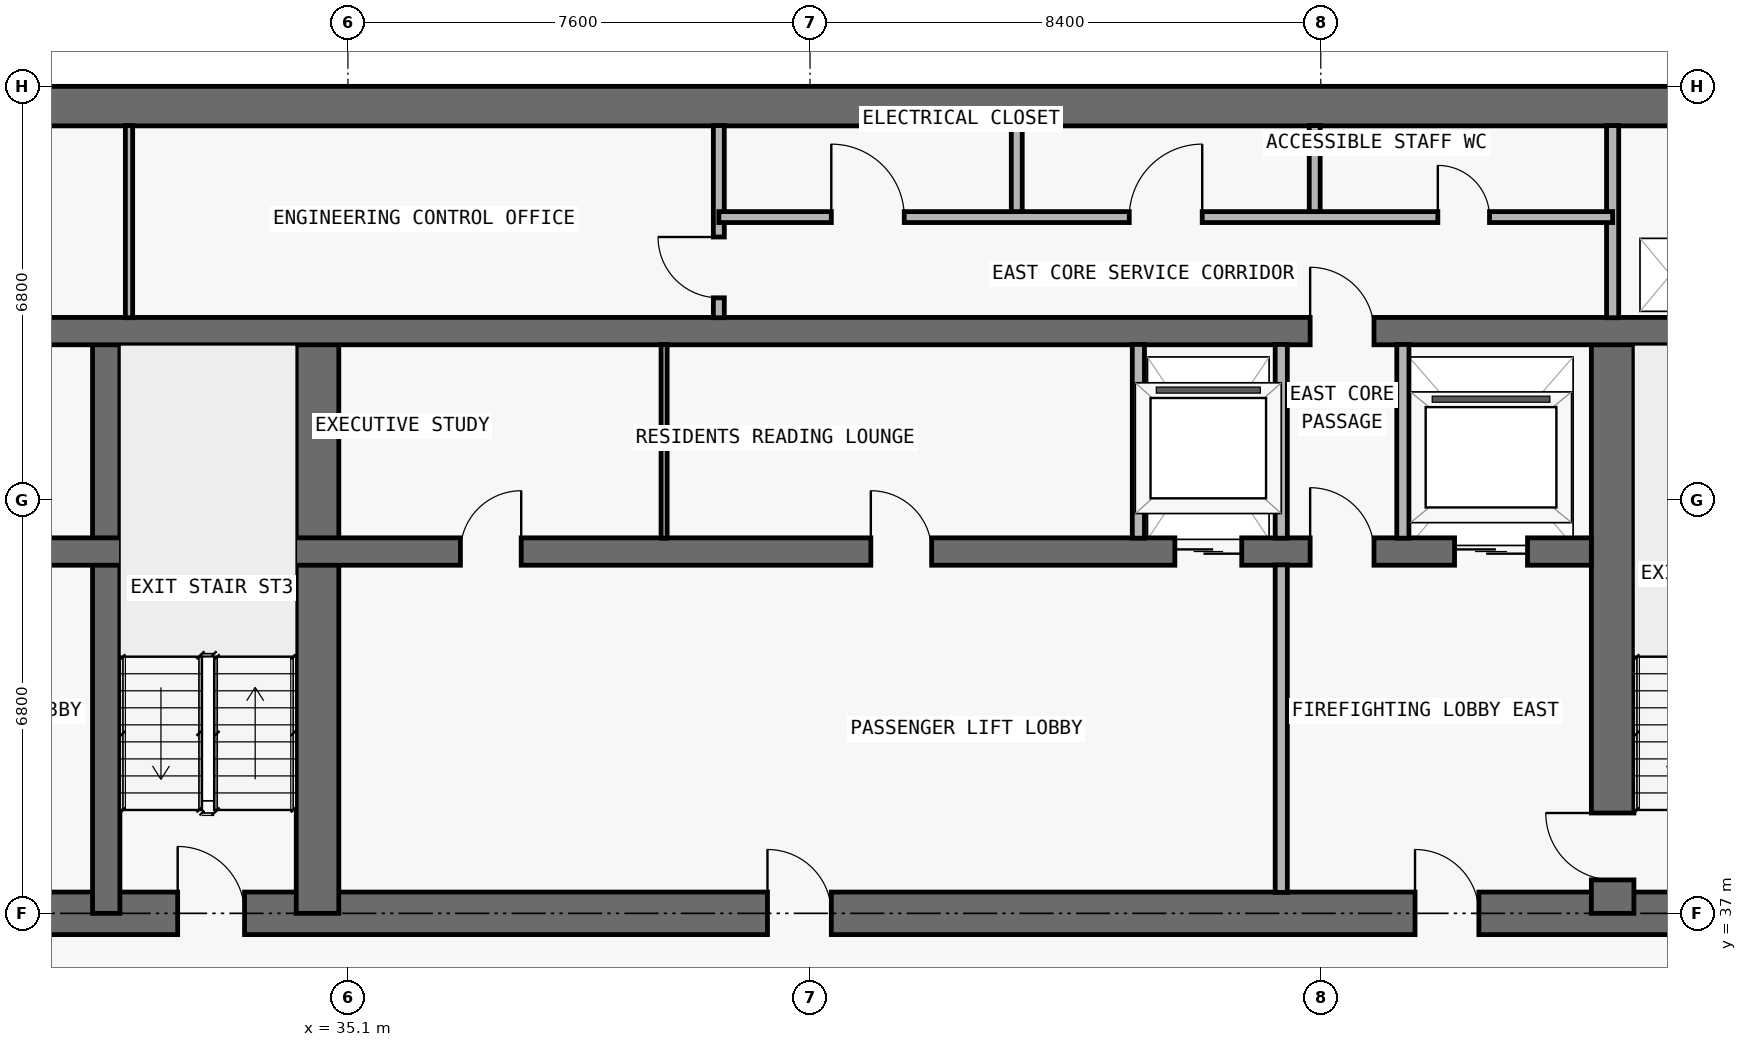
"""IFC4 building model, lengths in metres.
Left out: names, types, materials, properties, quantities, classifications, styles, units other than length and angle.
Written with IfcOpenShell. Run it as: python <this file> out.ifc"""

import sys

from ifc_helpers import new_model, si_unit, direction, frame, frame_2d, origin, place, context, subcontext, project, spatial, rectangle, extrude, element, fill, save


model = new_model("IFC4")
c1 = context("Model", 3, precision=1e-05, world=origin(), true_north=direction((0.0, 1.0)))
c2 = subcontext(c1, "Body", "Model", "MODEL_VIEW")
j1 = project(units=[si_unit("LENGTHUNIT", "METRE"), si_unit("PLANEANGLEUNIT", "RADIAN")], contexts=[c1])
p1 = place(None, origin())
s1 = spatial("IfcSite", under=j1, at=p1, CompositionType="ELEMENT")
p2 = place(p1, origin())
s2 = spatial("IfcBuilding", under=s1, at=p2, CompositionType="ELEMENT")
p3 = place(p2, frame((0.0, 0.0, 204.9)))
s3 = spatial("IfcBuildingStorey", under=s2, at=p3, CompositionType="ELEMENT", Elevation=204.9)
p4 = place(p3, frame((17.95, 37.0, 0.0), z_axis=(0.0, 0.0, 1.0), x_axis=(1.0, 0.0, 0.0)))
e1 = element("IfcWall", 1, at=p4, inside=s3, PredefinedType="SHEAR", context=c2, shape_type="SweptSolid", body=[
    extrude(rectangle(XDim=41.9, YDim=0.7, at=frame_2d((20.95, 0.0))), origin(), (0.0, 0.0, 1.0), 3.05),
])
p5 = place(p4, frame((14.35, 0.0, 0.0)))
e2 = element("IfcOpeningElement", 2, at=p5, cuts=e1, PredefinedType="OPENING", context=c2, shape_type="SweptSolid", body=[
    extrude(rectangle(XDim=1.1, YDim=2.15, at=frame_2d((0.55, 1.075))), frame((0.0, 0.36, 0.0), z_axis=(0.0, -1.0, 0.0), x_axis=(1.0, 0.0, 0.0)), (0.0, 0.0, 1.0), 0.72),
])
p6 = place(p4, frame((6.2, 0.0, 0.0)))
e3 = element("IfcOpeningElement", 3, at=p6, cuts=e1, PredefinedType="OPENING", context=c2, shape_type="SweptSolid", body=[
    extrude(rectangle(XDim=1.05, YDim=2.15, at=frame_2d((0.525, 1.075))), frame((0.0, 0.36, 0.0), z_axis=(0.0, -1.0, 0.0), x_axis=(1.0, 0.0, 0.0)), (0.0, 0.0, 1.0), 0.72),
])
p7 = place(p4, frame((34.7, 0.0, 0.0)))
e4 = element("IfcOpeningElement", 4, at=p7, cuts=e1, PredefinedType="OPENING", context=c2, shape_type="SweptSolid", body=[
    extrude(rectangle(XDim=1.05, YDim=2.15, at=frame_2d((0.525, 1.075))), frame((0.0, 0.36, 0.0), z_axis=(0.0, -1.0, 0.0), x_axis=(1.0, 0.0, 0.0)), (0.0, 0.0, 1.0), 0.72),
])
p8 = place(p4, frame((10.812, 0.0, 0.0)))
e5 = element("IfcOpeningElement", 5, at=p8, cuts=e1, PredefinedType="OPENING", context=c2, shape_type="SweptSolid", body=[
    extrude(rectangle(XDim=1.05, YDim=2.15, at=frame_2d((0.525, 1.075))), frame((0.0, 0.36, 0.0), z_axis=(0.0, -1.0, 0.0), x_axis=(1.0, 0.0, 0.0)), (0.0, 0.0, 1.0), 0.72),
])
p9 = place(p4, frame((24.05, 0.0, 0.0)))
e6 = element("IfcOpeningElement", 6, at=p9, cuts=e1, PredefinedType="OPENING", context=c2, shape_type="SweptSolid", body=[
    extrude(rectangle(XDim=1.05, YDim=2.15, at=frame_2d((0.525, 1.075))), frame((0.0, 0.36, 0.0), z_axis=(0.0, -1.0, 0.0), x_axis=(1.0, 0.0, 0.0)), (0.0, 0.0, 1.0), 0.72),
])
p10 = place(p3, frame((17.95, 50.275, 0.0), z_axis=(0.0, 0.0, 1.0), x_axis=(1.0, 0.0, 0.0)))
e7 = element("IfcWall", 7, at=p10, inside=s3, PredefinedType="SHEAR", context=c2, shape_type="SweptSolid", body=[
    extrude(rectangle(XDim=41.9, YDim=0.65, at=frame_2d((20.95, 0.0))), origin(), (0.0, 0.0, 1.0), 3.05),
])
p11 = place(p3, frame((55.9, 37.0, 0.0), z_axis=(0.0, 0.0, 1.0), x_axis=(0.0, 1.0, 0.0)))
e8 = element("IfcWall", 8, at=p11, inside=s3, PredefinedType="SHEAR", context=c2, shape_type="SweptSolid", body=[
    extrude(rectangle(XDim=9.575, YDim=0.7, at=frame_2d((4.788, 0.0))), origin(), (0.0, 0.0, 1.0), 3.05),
])
p12 = place(p11, frame((0.55, 0.0, 0.0)))
e9 = element("IfcOpeningElement", 9, at=p12, cuts=e8, PredefinedType="OPENING", context=c2, shape_type="SweptSolid", body=[
    extrude(rectangle(XDim=1.1, YDim=2.15, at=frame_2d((0.55, 1.075))), frame((0.0, 0.36, 0.0), z_axis=(0.0, -1.0, 0.0), x_axis=(1.0, 0.0, 0.0)), (0.0, 0.0, 1.0), 0.72),
])
p13 = place(p3, frame((31.125, 37.0, 0.0), z_axis=(0.0, 0.0, 1.0), x_axis=(0.0, 1.0, 0.0)))
e10 = element("IfcWall", 10, at=p13, inside=s3, PredefinedType="SHEAR", context=c2, shape_type="SweptSolid", body=[
    extrude(rectangle(XDim=9.575, YDim=0.45, at=frame_2d((4.788, 0.0))), origin(), (0.0, 0.0, 1.0), 3.05),
])
p14 = place(p3, frame((34.6, 37.0, 0.0), z_axis=(0.0, 0.0, 1.0), x_axis=(0.0, 1.0, 0.0)))
e11 = element("IfcWall", 11, at=p14, inside=s3, PredefinedType="SHEAR", context=c2, shape_type="SweptSolid", body=[
    extrude(rectangle(XDim=9.575, YDim=0.7, at=frame_2d((4.788, 0.0))), origin(), (0.0, 0.0, 1.0), 3.05),
])
p15 = place(p3, frame((22.25, 42.95, 0.0), z_axis=(0.0, 0.0, 1.0), x_axis=(1.0, 0.0, 0.0)))
e12 = element("IfcWall", 12, at=p15, inside=s3, PredefinedType="SHEAR", context=c2, shape_type="SweptSolid", body=[
    extrude(rectangle(XDim=33.3, YDim=0.45, at=frame_2d((16.65, 0.0))), origin(), (0.0, 0.0, 1.0), 3.05),
])
p16 = place(p15, frame((1.05, 0.0, 0.0)))
e13 = element("IfcOpeningElement", 13, at=p16, cuts=e12, PredefinedType="OPENING", context=c2, shape_type="SweptSolid", body=[
    extrude(rectangle(XDim=1.2, YDim=2.2, at=frame_2d((0.6, 1.1))), frame((0.0, 0.235, 0.0), z_axis=(0.0, -1.0, 0.0), x_axis=(1.0, 0.0, 0.0)), (0.0, 0.0, 1.0), 0.47),
])
p17 = place(p15, frame((31.05, 0.0, 0.0)))
e14 = element("IfcOpeningElement", 14, at=p17, cuts=e12, PredefinedType="OPENING", context=c2, shape_type="SweptSolid", body=[
    extrude(rectangle(XDim=1.2, YDim=2.2, at=frame_2d((0.6, 1.1))), frame((0.0, 0.235, 0.0), z_axis=(0.0, -1.0, 0.0), x_axis=(1.0, 0.0, 0.0)), (0.0, 0.0, 1.0), 0.47),
])
p18 = place(p15, frame((26.45, 0.0, 0.0)))
e15 = element("IfcOpeningElement", 15, at=p18, cuts=e12, PredefinedType="OPENING", context=c2, shape_type="SweptSolid", body=[
    extrude(rectangle(XDim=1.1, YDim=2.2, at=frame_2d((0.55, 1.1))), frame((0.0, 0.235, 0.0), z_axis=(0.0, -1.0, 0.0), x_axis=(1.0, 0.0, 0.0)), (0.0, 0.0, 1.0), 0.47),
])
p19 = place(p15, frame((5.95, 0.0, 0.0)))
e16 = element("IfcOpeningElement", 16, at=p19, cuts=e12, PredefinedType="OPENING", context=c2, shape_type="SweptSolid", body=[
    extrude(rectangle(XDim=1.1, YDim=2.2, at=frame_2d((0.55, 1.1))), frame((0.0, 0.235, 0.0), z_axis=(0.0, -1.0, 0.0), x_axis=(1.0, 0.0, 0.0)), (0.0, 0.0, 1.0), 0.47),
])
p20 = place(p15, frame((3.625, 0.0, 0.0)))
e17 = element("IfcOpeningElement", 17, at=p20, cuts=e12, PredefinedType="OPENING", context=c2, shape_type="SweptSolid", body=[
    extrude(rectangle(XDim=1.05, YDim=2.15, at=frame_2d((0.525, 1.075))), frame((0.0, 0.235, 0.0), z_axis=(0.0, -1.0, 0.0), x_axis=(1.0, 0.0, 0.0)), (0.0, 0.0, 1.0), 0.47),
])
p21 = place(p15, frame((28.675, 0.0, 0.0)))
e18 = element("IfcOpeningElement", 18, at=p21, cuts=e12, PredefinedType="OPENING", context=c2, shape_type="SweptSolid", body=[
    extrude(rectangle(XDim=1.05, YDim=2.15, at=frame_2d((0.525, 1.075))), frame((0.0, 0.235, 0.0), z_axis=(0.0, -1.0, 0.0), x_axis=(1.0, 0.0, 0.0)), (0.0, 0.0, 1.0), 0.47),
])
p22 = place(p15, frame((14.7, 0.0, 0.0)))
e19 = element("IfcOpeningElement", 19, at=p22, cuts=e12, PredefinedType="OPENING", context=c2, shape_type="SweptSolid", body=[
    extrude(rectangle(XDim=1.0, YDim=2.2, at=frame_2d((0.5, 1.1))), frame((0.0, 0.235, 0.0), z_axis=(0.0, -1.0, 0.0), x_axis=(1.0, 0.0, 0.0)), (0.0, 0.0, 1.0), 0.47),
])
p23 = place(p15, frame((21.45, 0.0, 0.0)))
e20 = element("IfcOpeningElement", 20, at=p23, cuts=e12, PredefinedType="OPENING", context=c2, shape_type="SweptSolid", body=[
    extrude(rectangle(XDim=1.0, YDim=2.2, at=frame_2d((0.5, 1.1))), frame((0.0, 0.235, 0.0), z_axis=(0.0, -1.0, 0.0), x_axis=(1.0, 0.0, 0.0)), (0.0, 0.0, 1.0), 0.47),
])
p24 = place(p3, frame((18.3, 46.575, 0.0), z_axis=(0.0, 0.0, 1.0), x_axis=(1.0, 0.0, 0.0)))
e21 = element("IfcWall", 21, at=p24, inside=s3, PredefinedType="SHEAR", context=c2, shape_type="SweptSolid", body=[
    extrude(rectangle(XDim=41.2, YDim=0.45, at=frame_2d((20.6, 0.0))), origin(), (0.0, 0.0, 1.0), 3.05),
])
p25 = place(p24, frame((7.6, 0.0, 0.0)))
e22 = element("IfcOpeningElement", 22, at=p25, cuts=e21, PredefinedType="OPENING", context=c2, shape_type="SweptSolid", body=[
    extrude(rectangle(XDim=1.0, YDim=2.2, at=frame_2d((0.5, 1.1))), frame((0.0, 0.235, 0.0), z_axis=(0.0, -1.0, 0.0), x_axis=(1.0, 0.0, 0.0)), (0.0, 0.0, 1.0), 0.47),
])
p26 = place(p24, frame((32.625, 0.0, 0.0)))
e23 = element("IfcOpeningElement", 23, at=p26, cuts=e21, PredefinedType="OPENING", context=c2, shape_type="SweptSolid", body=[
    extrude(rectangle(XDim=1.05, YDim=2.15, at=frame_2d((0.525, 1.075))), frame((0.0, 0.235, 0.0), z_axis=(0.0, -1.0, 0.0), x_axis=(1.0, 0.0, 0.0)), (0.0, 0.0, 1.0), 0.47),
])
p27 = place(p3, frame((31.5, 46.795, 0.0), z_axis=(0.0, 0.0, 1.0), x_axis=(0.0, 1.0, 0.0)))
e24 = element("IfcWall", 24, at=p27, inside=s3, PredefinedType="PARTITIONING", context=c2, shape_type="SweptSolid", body=[
    extrude(rectangle(XDim=3.16, YDim=0.12, at=frame_2d((1.58, 0.0))), origin(), (0.0, 0.0, 1.0), 3.05),
])
p28 = place(p3, frame((40.3, 43.17, 0.0), z_axis=(0.0, 0.0, 1.0), x_axis=(0.0, 1.0, 0.0)))
e25 = element("IfcWall", 25, at=p28, inside=s3, PredefinedType="MOVABLE", context=c2, shape_type="SweptSolid", body=[
    extrude(rectangle(XDim=3.185, YDim=0.1, at=frame_2d((1.593, 0.0))), origin(), (0.0, 0.0, 1.0), 3.05),
])
p29 = place(p3, frame((41.2, 46.795, 0.0), z_axis=(0.0, 0.0, 1.0), x_axis=(0.0, 1.0, 0.0)))
e26 = element("IfcWall", 26, at=p29, inside=s3, PredefinedType="PARTITIONING", context=c2, shape_type="SweptSolid", body=[
    extrude(rectangle(XDim=3.16, YDim=0.18, at=frame_2d((1.58, 0.0))), origin(), (0.0, 0.0, 1.0), 3.05),
])
p30 = place(p29, frame((0.327, 0.0, 0.0)))
e27 = element("IfcOpeningElement", 27, at=p30, cuts=e26, PredefinedType="OPENING", context=c2, shape_type="SweptSolid", body=[
    extrude(rectangle(XDim=1.0, YDim=2.2, at=frame_2d((0.5, 1.1))), frame((0.0, 0.1, 0.0), z_axis=(0.0, -1.0, 0.0), x_axis=(1.0, 0.0, 0.0)), (0.0, 0.0, 1.0), 0.2),
])
p31 = place(p3, frame((46.1, 48.45, 0.0), z_axis=(0.0, 0.0, 1.0), x_axis=(0.0, 1.0, 0.0)))
e28 = element("IfcWall", 28, at=p31, inside=s3, PredefinedType="PARTITIONING", context=c2, shape_type="SweptSolid", body=[
    extrude(rectangle(XDim=1.505, YDim=0.18, at=frame_2d((0.752, 0.0))), origin(), (0.0, 0.0, 1.0), 3.05),
])
p32 = place(p3, frame((48.1, 43.17, 0.0), z_axis=(0.0, 0.0, 1.0), x_axis=(0.0, 1.0, 0.0)))
e29 = element("IfcWall", 29, at=p32, inside=s3, PredefinedType="PARTITIONING", context=c2, shape_type="SweptSolid", body=[
    extrude(rectangle(XDim=3.185, YDim=0.2, at=frame_2d((1.593, 0.0))), origin(), (0.0, 0.0, 1.0), 3.05),
])
p33 = place(p3, frame((50.45, 37.345, 0.0), z_axis=(0.0, 0.0, 1.0), x_axis=(0.0, 1.0, 0.0)))
e30 = element("IfcWall", 30, at=p33, inside=s3, PredefinedType="PARTITIONING", context=c2, shape_type="SweptSolid", body=[
    extrude(rectangle(XDim=5.385, YDim=0.2, at=frame_2d((2.692, 0.0))), origin(), (0.0, 0.0, 1.0), 3.05),
])
p34 = place(p3, frame((50.45, 43.17, 0.0), z_axis=(0.0, 0.0, 1.0), x_axis=(0.0, 1.0, 0.0)))
e31 = element("IfcWall", 31, at=p34, inside=s3, PredefinedType="PARTITIONING", context=c2, shape_type="SweptSolid", body=[
    extrude(rectangle(XDim=3.185, YDim=0.2, at=frame_2d((1.593, 0.0))), origin(), (0.0, 0.0, 1.0), 3.05),
])
p35 = place(p3, frame((51.0, 48.45, 0.0), z_axis=(0.0, 0.0, 1.0), x_axis=(0.0, 1.0, 0.0)))
e32 = element("IfcWall", 32, at=p35, inside=s3, PredefinedType="PARTITIONING", context=c2, shape_type="SweptSolid", body=[
    extrude(rectangle(XDim=1.505, YDim=0.18, at=frame_2d((0.752, 0.0))), origin(), (0.0, 0.0, 1.0), 3.05),
])
p36 = place(p3, frame((52.45, 43.17, 0.0), z_axis=(0.0, 0.0, 1.0), x_axis=(0.0, 1.0, 0.0)))
e33 = element("IfcWall", 33, at=p36, inside=s3, PredefinedType="PARTITIONING", context=c2, shape_type="SweptSolid", body=[
    extrude(rectangle(XDim=3.185, YDim=0.2, at=frame_2d((1.593, 0.0))), origin(), (0.0, 0.0, 1.0), 3.05),
])
p37 = place(p3, frame((55.9, 46.795, 0.0), z_axis=(0.0, 0.0, 1.0), x_axis=(0.0, 1.0, 0.0)))
e34 = element("IfcWall", 34, at=p37, inside=s3, PredefinedType="PARTITIONING", context=c2, shape_type="SweptSolid", body=[
    extrude(rectangle(XDim=3.16, YDim=0.2, at=frame_2d((1.58, 0.0))), origin(), (0.0, 0.0, 1.0), 3.05),
])
p38 = place(p3, frame((41.2, 48.45, 0.0), z_axis=(0.0, 0.0, 1.0), x_axis=(1.0, 0.0, 0.0)))
e35 = element("IfcWall", 35, at=p38, inside=s3, PredefinedType="PARTITIONING", context=c2, shape_type="SweptSolid", body=[
    extrude(rectangle(XDim=14.7, YDim=0.18, at=frame_2d((7.35, 0.0))), origin(), (0.0, 0.0, 1.0), 3.05),
])
p39 = place(p38, frame((1.85, 0.0, 0.0)))
e36 = element("IfcOpeningElement", 36, at=p39, cuts=e35, PredefinedType="OPENING", context=c2, shape_type="SweptSolid", body=[
    extrude(rectangle(XDim=1.2, YDim=2.2, at=frame_2d((0.6, 1.1))), frame((0.0, 0.1, 0.0), z_axis=(0.0, -1.0, 0.0), x_axis=(1.0, 0.0, 0.0)), (0.0, 0.0, 1.0), 0.2),
])
p40 = place(p38, frame((6.75, 0.0, 0.0)))
e37 = element("IfcOpeningElement", 37, at=p40, cuts=e35, PredefinedType="OPENING", context=c2, shape_type="SweptSolid", body=[
    extrude(rectangle(XDim=1.2, YDim=2.2, at=frame_2d((0.6, 1.1))), frame((0.0, 0.1, 0.0), z_axis=(0.0, -1.0, 0.0), x_axis=(1.0, 0.0, 0.0)), (0.0, 0.0, 1.0), 0.2),
])
p41 = place(p38, frame((11.825, 0.0, 0.0)))
e38 = element("IfcOpeningElement", 38, at=p41, cuts=e35, PredefinedType="OPENING", context=c2, shape_type="SweptSolid", body=[
    extrude(rectangle(XDim=0.85, YDim=2.1, at=frame_2d((0.425, 1.05))), frame((0.0, 0.1, 0.0), z_axis=(0.0, -1.0, 0.0), x_axis=(1.0, 0.0, 0.0)), (0.0, 0.0, 1.0), 0.2),
])
p42 = place(p17, origin())
e39 = element("IfcDoor", 39, at=p42, inside=s3, OperationType="DOUBLE_DOOR_SLIDING", PredefinedType="DOOR", context=c2, shape_type="SweptSolid", body=[
    extrude(rectangle(XDim=1.2, YDim=2.2, at=frame_2d((0.6, 1.1))), frame((0.0, 0.025, 0.0), z_axis=(0.0, -1.0, 0.0), x_axis=(1.0, 0.0, 0.0)), (0.0, 0.0, 1.0), 0.05),
])
fill(e14, e39)
p43 = place(p18, origin())
e40 = element("IfcDoor", 40, at=p43, inside=s3, OperationType="DOUBLE_DOOR_SLIDING", PredefinedType="DOOR", context=c2, shape_type="SweptSolid", body=[
    extrude(rectangle(XDim=1.1, YDim=2.2, at=frame_2d((0.55, 1.1))), frame((0.0, 0.025, 0.0), z_axis=(0.0, -1.0, 0.0), x_axis=(1.0, 0.0, 0.0)), (0.0, 0.0, 1.0), 0.05),
])
fill(e15, e40)
p44 = place(p5, origin())
e41 = element("IfcDoor", 41, at=p44, inside=s3, OperationType="SINGLE_SWING_LEFT", PredefinedType="DOOR", context=c2, shape_type="SweptSolid", body=[
    extrude(rectangle(XDim=1.1, YDim=2.15, at=frame_2d((0.55, 1.075))), frame((0.0, 0.025, 0.0), z_axis=(0.0, -1.0, 0.0), x_axis=(1.0, 0.0, 0.0)), (0.0, 0.0, 1.0), 0.05),
])
fill(e2, e41)
p45 = place(p7, origin())
e42 = element("IfcDoor", 42, at=p45, inside=s3, OperationType="SINGLE_SWING_LEFT", PredefinedType="DOOR", context=c2, shape_type="SweptSolid", body=[
    extrude(rectangle(XDim=1.05, YDim=2.15, at=frame_2d((0.525, 1.075))), frame((0.0, 0.025, 0.0), z_axis=(0.0, -1.0, 0.0), x_axis=(1.0, 0.0, 0.0)), (0.0, 0.0, 1.0), 0.05),
])
fill(e4, e42)
p46 = place(p12, origin())
e43 = element("IfcDoor", 43, at=p46, inside=s3, OperationType="SINGLE_SWING_RIGHT", PredefinedType="DOOR", context=c2, shape_type="SweptSolid", body=[
    extrude(rectangle(XDim=1.1, YDim=2.15, at=frame_2d((0.55, 1.075))), frame((0.0, 0.025, 0.0), z_axis=(0.0, -1.0, 0.0), x_axis=(1.0, 0.0, 0.0)), (0.0, 0.0, 1.0), 0.05),
])
fill(e9, e43)
p47 = place(p21, origin())
e44 = element("IfcDoor", 44, at=p47, inside=s3, OperationType="SINGLE_SWING_LEFT", PredefinedType="DOOR", context=c2, shape_type="SweptSolid", body=[
    extrude(rectangle(XDim=1.05, YDim=2.15, at=frame_2d((0.525, 1.075))), frame((0.0, 0.025, 0.0), z_axis=(0.0, -1.0, 0.0), x_axis=(1.0, 0.0, 0.0)), (0.0, 0.0, 1.0), 0.05),
])
fill(e18, e44)
p48 = place(p9, origin())
e45 = element("IfcDoor", 45, at=p48, inside=s3, OperationType="SINGLE_SWING_LEFT", PredefinedType="DOOR", context=c2, shape_type="SweptSolid", body=[
    extrude(rectangle(XDim=1.05, YDim=2.15, at=frame_2d((0.525, 1.075))), frame((0.0, 0.025, 0.0), z_axis=(0.0, -1.0, 0.0), x_axis=(1.0, 0.0, 0.0)), (0.0, 0.0, 1.0), 0.05),
])
fill(e6, e45)
p49 = place(p22, origin())
e46 = element("IfcDoor", 46, at=p49, inside=s3, OperationType="SINGLE_SWING_RIGHT", PredefinedType="DOOR", context=c2, shape_type="SweptSolid", body=[
    extrude(rectangle(XDim=1.0, YDim=2.2, at=frame_2d((0.5, 1.1))), frame((0.0, 0.025, 0.0), z_axis=(0.0, -1.0, 0.0), x_axis=(1.0, 0.0, 0.0)), (0.0, 0.0, 1.0), 0.05),
])
fill(e19, e46)
p50 = place(p23, origin())
e47 = element("IfcDoor", 47, at=p50, inside=s3, OperationType="SINGLE_SWING_LEFT", PredefinedType="DOOR", context=c2, shape_type="SweptSolid", body=[
    extrude(rectangle(XDim=1.0, YDim=2.2, at=frame_2d((0.5, 1.1))), frame((0.0, 0.025, 0.0), z_axis=(0.0, -1.0, 0.0), x_axis=(1.0, 0.0, 0.0)), (0.0, 0.0, 1.0), 0.05),
])
fill(e20, e47)
p51 = place(p26, origin())
e48 = element("IfcDoor", 48, at=p51, inside=s3, OperationType="SINGLE_SWING_LEFT", PredefinedType="DOOR", context=c2, shape_type="SweptSolid", body=[
    extrude(rectangle(XDim=1.05, YDim=2.15, at=frame_2d((0.525, 1.075))), frame((0.0, 0.025, 0.0), z_axis=(0.0, -1.0, 0.0), x_axis=(1.0, 0.0, 0.0)), (0.0, 0.0, 1.0), 0.05),
])
fill(e23, e48)
p52 = place(p30, origin())
e49 = element("IfcDoor", 49, at=p52, inside=s3, OperationType="SINGLE_SWING_RIGHT", PredefinedType="DOOR", context=c2, shape_type="SweptSolid", body=[
    extrude(rectangle(XDim=1.0, YDim=2.2, at=frame_2d((0.5, 1.1))), frame((0.0, 0.025, 0.0), z_axis=(0.0, -1.0, 0.0), x_axis=(1.0, 0.0, 0.0)), (0.0, 0.0, 1.0), 0.05),
])
fill(e27, e49)
p53 = place(p39, origin())
e50 = element("IfcDoor", 50, at=p53, inside=s3, OperationType="SINGLE_SWING_LEFT", PredefinedType="DOOR", context=c2, shape_type="SweptSolid", body=[
    extrude(rectangle(XDim=1.2, YDim=2.2, at=frame_2d((0.6, 1.1))), frame((0.0, 0.025, 0.0), z_axis=(0.0, -1.0, 0.0), x_axis=(1.0, 0.0, 0.0)), (0.0, 0.0, 1.0), 0.05),
])
fill(e36, e50)
p54 = place(p40, origin())
e51 = element("IfcDoor", 51, at=p54, inside=s3, OperationType="SINGLE_SWING_RIGHT", PredefinedType="DOOR", context=c2, shape_type="SweptSolid", body=[
    extrude(rectangle(XDim=1.2, YDim=2.2, at=frame_2d((0.6, 1.1))), frame((0.0, 0.025, 0.0), z_axis=(0.0, -1.0, 0.0), x_axis=(1.0, 0.0, 0.0)), (0.0, 0.0, 1.0), 0.05),
])
fill(e37, e51)
p55 = place(p41, origin())
e52 = element("IfcDoor", 52, at=p55, inside=s3, OperationType="SINGLE_SWING_LEFT", PredefinedType="DOOR", context=c2, shape_type="SweptSolid", body=[
    extrude(rectangle(XDim=0.85, YDim=2.1, at=frame_2d((0.425, 1.05))), frame((0.0, 0.025, 0.0), z_axis=(0.0, -1.0, 0.0), x_axis=(1.0, 0.0, 0.0)), (0.0, 0.0, 1.0), 0.05),
])
fill(e38, e52)
save(model, sys.argv[1])
